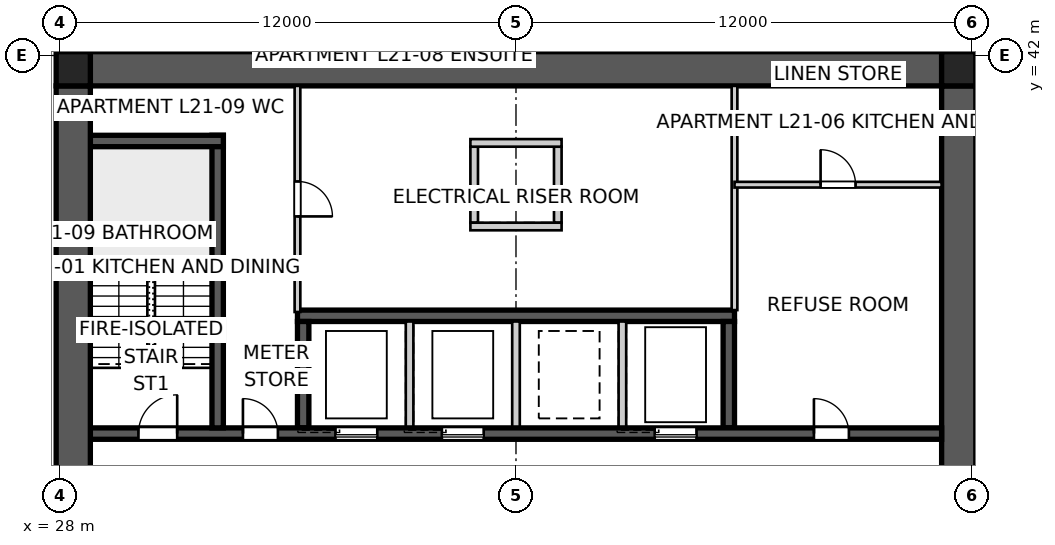
"""IFC4 building model, lengths in metres.
Left out: names, types, materials, properties, quantities, classifications, styles, units other than length and angle.
Written with IfcOpenShell. Run it as: python <this file> out.ifc"""

import sys

from ifc_helpers import new_model, si_unit, direction, frame, frame_2d, origin, origin_2d, place, context, subcontext, project, spatial, polyline, rectangle, outline, extrude, element, fill, save


model = new_model("IFC4")
c1 = context("Model", 3, precision=1e-05, world=origin(), true_north=direction((0.0, 1.0)))
c2 = subcontext(c1, "Body", "Model", "MODEL_VIEW")
j1 = project(units=[si_unit("LENGTHUNIT", "METRE"), si_unit("PLANEANGLEUNIT", "RADIAN")], contexts=[c1])
p1 = place(None, origin())
s1 = spatial("IfcSite", under=j1, at=p1, CompositionType="ELEMENT")
p2 = place(p1, origin())
s2 = spatial("IfcBuilding", under=s1, at=p2, CompositionType="ELEMENT")
p3 = place(p2, frame((0.0, 0.0, 79.4)))
s3 = spatial("IfcBuildingStorey", under=s2, at=p3, CompositionType="ELEMENT", Elevation=79.4)
p4 = place(p3, frame((28.8, 41.65, 0.0), z_axis=(0.0, 0.0, 1.0), x_axis=(1.0, 0.0, 0.0)))
e1 = element("IfcWall", 1, at=p4, inside=s3, PredefinedType="SHEAR", context=c2, shape_type="SweptSolid", body=[
    extrude(outline(polyline([(0.0, -0.45), (22.4, -0.45), (22.4, -0.025), (22.85, -0.025), (22.85, 0.025), (22.4, 0.025), (22.4, 0.45), (0.0, 0.45), (0.0, 0.025), (-0.45, 0.025), (-0.45, -0.025), (0.0, -0.025), (0.0, -0.45)])), origin(), (0.0, 0.0, 1.0), 3.4),
])
p5 = place(p3, frame((51.65, 18.8, 0.0), z_axis=(0.0, 0.0, 1.0), x_axis=(0.0, 1.0, 0.0)))
e2 = element("IfcWall", 2, at=p5, inside=s3, PredefinedType="SHEAR", context=c2, shape_type="SweptSolid", body=[
    extrude(outline(polyline([(0.0, -0.45), (22.4, -0.45), (22.4, -0.025), (22.85, -0.025), (22.85, 0.025), (22.4, 0.025), (22.4, 0.45), (0.0, 0.45), (0.0, 0.025), (-0.45, 0.025), (-0.45, -0.025), (0.0, -0.025), (0.0, -0.45)])), origin(), (0.0, 0.0, 1.0), 3.4),
])
p6 = place(p5, frame((11.14, 0.0, 0.0)))
e3 = element("IfcOpeningElement", 3, at=p6, cuts=e2, PredefinedType="OPENING", context=c2, shape_type="SweptSolid", body=[
    extrude(rectangle(XDim=1.02, YDim=2.4, at=frame_2d((0.51, 1.2))), frame((0.0, 0.46, 0.0), z_axis=(0.0, -1.0, 0.0), x_axis=(1.0, 0.0, 0.0)), (0.0, 0.0, 1.0), 0.92),
])
p7 = place(p3, frame((28.35, 41.2, 0.0), z_axis=(0.0, 0.0, 1.0), x_axis=(0.0, -1.0, 0.0)))
e4 = element("IfcWall", 4, at=p7, inside=s3, PredefinedType="SHEAR", context=c2, shape_type="SweptSolid", body=[
    extrude(outline(polyline([(0.0, -0.45), (22.4, -0.45), (22.4, -0.025), (22.85, -0.025), (22.85, 0.025), (22.4, 0.025), (22.4, 0.45), (0.0, 0.45), (0.0, 0.025), (-0.45, 0.025), (-0.45, -0.025), (0.0, -0.025), (0.0, -0.45)])), origin(), (0.0, 0.0, 1.0), 3.4),
])
p8 = place(p7, frame((11.14, 0.0, 0.0)))
e5 = element("IfcOpeningElement", 5, at=p8, cuts=e4, PredefinedType="OPENING", context=c2, shape_type="SweptSolid", body=[
    extrude(rectangle(XDim=1.02, YDim=2.4, at=frame_2d((0.51, 1.2))), frame((0.0, 0.46, 0.0), z_axis=(0.0, -1.0, 0.0), x_axis=(1.0, 0.0, 0.0)), (0.0, 0.0, 1.0), 0.92),
])
p9 = place(p3, frame((28.8, 32.05, 0.0), z_axis=(0.0, 0.0, 1.0), x_axis=(1.0, 0.0, 0.0)))
e6 = element("IfcWall", 6, at=p9, inside=s3, PredefinedType="SHEAR", context=c2, shape_type="SweptSolid", body=[
    extrude(rectangle(XDim=22.4, YDim=0.3, at=frame_2d((11.2, 0.0))), origin(), (0.0, 0.0, 1.0), 3.4),
])
p10 = place(p9, frame((19.04, 0.0, 0.0)))
e7 = element("IfcOpeningElement", 7, at=p10, cuts=e6, PredefinedType="OPENING", context=c2, shape_type="SweptSolid", body=[
    extrude(rectangle(XDim=0.92, YDim=2.1, at=frame_2d((0.46, 1.05))), frame((0.0, 0.16, 0.0), z_axis=(0.0, -1.0, 0.0), x_axis=(1.0, 0.0, 0.0)), (0.0, 0.0, 1.0), 0.32),
])
p11 = place(p9, frame((1.265, 0.0, 0.0)))
e8 = element("IfcOpeningElement", 8, at=p11, cuts=e6, PredefinedType="OPENING", context=c2, shape_type="SweptSolid", body=[
    extrude(rectangle(XDim=1.02, YDim=2.1, at=frame_2d((0.51, 1.05))), frame((0.0, 0.16, 0.0), z_axis=(0.0, -1.0, 0.0), x_axis=(1.0, 0.0, 0.0)), (0.0, 0.0, 1.0), 0.32),
])
p12 = place(p9, frame((4.015, 0.0, 0.0)))
e9 = element("IfcOpeningElement", 9, at=p12, cuts=e6, PredefinedType="OPENING", context=c2, shape_type="SweptSolid", body=[
    extrude(rectangle(XDim=0.92, YDim=2.1, at=frame_2d((0.46, 1.05))), frame((0.0, 0.16, 0.0), z_axis=(0.0, -1.0, 0.0), x_axis=(1.0, 0.0, 0.0)), (0.0, 0.0, 1.0), 0.32),
])
p13 = place(p9, frame((6.45, 0.0, 0.0)))
e10 = element("IfcOpeningElement", 10, at=p13, cuts=e6, PredefinedType="OPENING", context=c2, shape_type="SweptSolid", body=[
    extrude(rectangle(XDim=1.1, YDim=2.1, at=frame_2d((0.55, 1.05))), frame((0.0, 0.16, 0.0), z_axis=(0.0, -1.0, 0.0), x_axis=(1.0, 0.0, 0.0)), (0.0, 0.0, 1.0), 0.32),
])
p14 = place(p9, frame((9.25, 0.0, 0.0)))
e11 = element("IfcOpeningElement", 11, at=p14, cuts=e6, PredefinedType="OPENING", context=c2, shape_type="SweptSolid", body=[
    extrude(rectangle(XDim=1.1, YDim=2.1, at=frame_2d((0.55, 1.05))), frame((0.0, 0.16, 0.0), z_axis=(0.0, -1.0, 0.0), x_axis=(1.0, 0.0, 0.0)), (0.0, 0.0, 1.0), 0.32),
])
p15 = place(p9, frame((14.85, 0.0, 0.0)))
e12 = element("IfcOpeningElement", 12, at=p15, cuts=e6, PredefinedType="OPENING", context=c2, shape_type="SweptSolid", body=[
    extrude(rectangle(XDim=1.1, YDim=2.1, at=frame_2d((0.55, 1.05))), frame((0.0, 0.16, 0.0), z_axis=(0.0, -1.0, 0.0), x_axis=(1.0, 0.0, 0.0)), (0.0, 0.0, 1.0), 0.32),
])
p16 = place(p3, frame((34.25, 35.15, 0.0), z_axis=(0.0, 0.0, 1.0), x_axis=(1.0, 0.0, 0.0)))
e13 = element("IfcWall", 13, at=p16, inside=s3, PredefinedType="SHEAR", context=c2, shape_type="SweptSolid", body=[
    extrude(rectangle(XDim=11.5, YDim=0.3, at=frame_2d((5.75, 0.0))), origin(), (0.0, 0.0, 1.0), 3.4),
])
p17 = place(p3, frame((34.4, 32.2, 0.0), z_axis=(0.0, 0.0, 1.0), x_axis=(0.0, 1.0, 0.0)))
e14 = element("IfcWall", 14, at=p17, inside=s3, PredefinedType="SHEAR", context=c2, shape_type="SweptSolid", body=[
    extrude(rectangle(XDim=2.8, YDim=0.3, at=frame_2d((1.4, 0.0))), origin(), (0.0, 0.0, 1.0), 3.4),
])
for number, where, z_axis, x_axis in (
    (15, (37.2, 32.2, 0.0), (0.0, 0.0, 1.0), (0.0, 1.0, 0.0)),
    (16, (40.0, 32.2, 0.0), (0.0, 0.0, 1.0), (0.0, 1.0, 0.0)),
    (17, (42.8, 32.2, 0.0), (0.0, 0.0, 1.0), (0.0, 1.0, 0.0)),
):
    element("IfcWall", number, at=place(p3, frame(where, z_axis=z_axis, x_axis=x_axis)), inside=s3, PredefinedType="SOLIDWALL", context=c2, shape_type="SweptSolid", body=[
        extrude(rectangle(XDim=2.8, YDim=0.2, at=frame_2d((1.4, 0.0))), origin(), (0.0, 0.0, 1.0), 3.4),
    ])
p18 = place(p3, frame((45.6, 32.2, 0.0), z_axis=(0.0, 0.0, 1.0), x_axis=(0.0, 1.0, 0.0)))
e18 = element("IfcWall", 18, at=p18, inside=s3, PredefinedType="SHEAR", context=c2, shape_type="SweptSolid", body=[
    extrude(rectangle(XDim=2.8, YDim=0.3, at=frame_2d((1.4, 0.0))), origin(), (0.0, 0.0, 1.0), 3.4),
])
p19 = place(p3, frame((32.15, 32.2, 0.0), z_axis=(0.0, 0.0, 1.0), x_axis=(0.0, 1.0, 0.0)))
e19 = element("IfcWall", 19, at=p19, inside=s3, PredefinedType="SHEAR", context=c2, shape_type="SweptSolid", body=[
    extrude(rectangle(XDim=7.7, YDim=0.3, at=frame_2d((3.85, 0.0))), origin(), (0.0, 0.0, 1.0), 3.4),
])
p20 = place(p3, frame((28.8, 39.75, 0.0), z_axis=(0.0, 0.0, 1.0), x_axis=(1.0, 0.0, 0.0)))
e20 = element("IfcWall", 20, at=p20, inside=s3, PredefinedType="SHEAR", context=c2, shape_type="SweptSolid", body=[
    extrude(rectangle(XDim=3.5, YDim=0.3, at=frame_2d((1.75, 0.0))), origin(), (0.0, 0.0, 1.0), 3.4),
])
for number, where, z_axis, x_axis in (
    (21, (38.9, 37.6, 0.0), (0.0, 0.0, 1.0), (0.0, 1.0, 0.0)),
    (22, (41.1, 37.6, 0.0), (0.0, 0.0, 1.0), (0.0, 1.0, 0.0)),
):
    element("IfcWall", number, at=place(p3, frame(where, z_axis=z_axis, x_axis=x_axis)), inside=s3, PredefinedType="SOLIDWALL", context=c2, shape_type="SweptSolid", body=[
        extrude(rectangle(XDim=2.0, YDim=0.2, at=frame_2d((1.0, 0.0))), origin(), (0.0, 0.0, 1.0), 3.4),
    ])
for number, where, z_axis, x_axis in (
    (23, (38.8, 37.5, 0.0), (0.0, 0.0, 1.0), (1.0, 0.0, 0.0)),
    (24, (38.8, 39.7, 0.0), (0.0, 0.0, 1.0), (1.0, 0.0, 0.0)),
):
    element("IfcWall", number, at=place(p3, frame(where, z_axis=z_axis, x_axis=x_axis)), inside=s3, PredefinedType="SOLIDWALL", context=c2, shape_type="SweptSolid", body=[
        extrude(rectangle(XDim=2.4, YDim=0.2, at=frame_2d((1.2, 0.0))), origin(), (0.0, 0.0, 1.0), 3.4),
    ])
for number, where, z_axis, x_axis in (
    (25, (51.65, 41.65, 0.0), (0.0, 0.0, 1.0), (1.0, 0.0, 0.0)),
    (26, (28.35, 41.65, 0.0), (0.0, 0.0, 1.0), (1.0, 0.0, 0.0)),
):
    element("IfcColumn", number, at=place(p3, frame(where, z_axis=z_axis, x_axis=x_axis)), inside=s3, PredefinedType="COLUMN", context=c2, shape_type="SweptSolid", body=[
        extrude(rectangle(XDim=0.9, YDim=0.9, at=origin_2d()), origin(), (0.0, 0.0, 1.0), 3.4),
    ])
p21 = place(p3, frame((34.25, 41.2, 0.0), z_axis=(0.0, 0.0, 1.0), x_axis=(0.0, -1.0, 0.0)))
e27 = element("IfcWall", 27, at=p21, inside=s3, PredefinedType="SOLIDWALL", context=c2, shape_type="SweptSolid", body=[
    extrude(rectangle(XDim=5.95, YDim=0.15, at=frame_2d((2.975, 0.0))), origin(), (0.0, 0.0, 1.0), 3.25),
])
p22 = place(p21, frame((2.515, 0.0, 0.0)))
e28 = element("IfcOpeningElement", 28, at=p22, cuts=e27, PredefinedType="OPENING", context=c2, shape_type="SweptSolid", body=[
    extrude(rectangle(XDim=0.92, YDim=2.1, at=frame_2d((0.46, 1.05))), frame((0.0, 0.085, 0.0), z_axis=(0.0, -1.0, 0.0), x_axis=(1.0, 0.0, 0.0)), (0.0, 0.0, 1.0), 0.17),
])
p23 = place(p3, frame((45.75, 41.2, 0.0), z_axis=(0.0, 0.0, 1.0), x_axis=(0.0, -1.0, 0.0)))
e29 = element("IfcWall", 29, at=p23, inside=s3, PredefinedType="SOLIDWALL", context=c2, shape_type="SweptSolid", body=[
    extrude(rectangle(XDim=5.9, YDim=0.15, at=frame_2d((2.95, 0.0))), origin(), (0.0, 0.0, 1.0), 3.25),
])
p24 = place(p3, frame((45.75, 38.6, 0.0), z_axis=(0.0, 0.0, 1.0), x_axis=(1.0, 0.0, 0.0)))
e30 = element("IfcWall", 30, at=p24, inside=s3, PredefinedType="SOLIDWALL", context=c2, shape_type="SweptSolid", body=[
    extrude(rectangle(XDim=5.45, YDim=0.15, at=frame_2d((2.725, 0.0))), origin(), (0.0, 0.0, 1.0), 3.25),
])
p25 = place(p24, frame((2.265, 0.0, 0.0)))
e31 = element("IfcOpeningElement", 31, at=p25, cuts=e30, PredefinedType="OPENING", context=c2, shape_type="SweptSolid", body=[
    extrude(rectangle(XDim=0.92, YDim=2.1, at=frame_2d((0.46, 1.05))), frame((0.0, 0.085, 0.0), z_axis=(0.0, -1.0, 0.0), x_axis=(1.0, 0.0, 0.0)), (0.0, 0.0, 1.0), 0.17),
])
p26 = place(p10, origin())
e32 = element("IfcDoor", 32, at=p26, inside=s3, OperationType="SINGLE_SWING_LEFT", PredefinedType="DOOR", context=c2, shape_type="SweptSolid", body=[
    extrude(rectangle(XDim=0.92, YDim=2.1, at=frame_2d((0.46, 1.05))), frame((0.0, 0.025, 0.0), z_axis=(0.0, -1.0, 0.0), x_axis=(1.0, 0.0, 0.0)), (0.0, 0.0, 1.0), 0.05),
])
fill(e7, e32)
p27 = place(p11, origin())
e33 = element("IfcDoor", 33, at=p27, inside=s3, OperationType="SINGLE_SWING_RIGHT", PredefinedType="DOOR", context=c2, shape_type="SweptSolid", body=[
    extrude(rectangle(XDim=1.02, YDim=2.1, at=frame_2d((0.51, 1.05))), frame((0.0, 0.025, 0.0), z_axis=(0.0, -1.0, 0.0), x_axis=(1.0, 0.0, 0.0)), (0.0, 0.0, 1.0), 0.05),
])
fill(e8, e33)
p28 = place(p12, origin())
e34 = element("IfcDoor", 34, at=p28, inside=s3, OperationType="SINGLE_SWING_LEFT", PredefinedType="DOOR", context=c2, shape_type="SweptSolid", body=[
    extrude(rectangle(XDim=0.92, YDim=2.1, at=frame_2d((0.46, 1.05))), frame((0.0, 0.025, 0.0), z_axis=(0.0, -1.0, 0.0), x_axis=(1.0, 0.0, 0.0)), (0.0, 0.0, 1.0), 0.05),
])
fill(e9, e34)
p29 = place(p25, origin())
e35 = element("IfcDoor", 35, at=p29, inside=s3, OperationType="SINGLE_SWING_LEFT", PredefinedType="DOOR", context=c2, shape_type="SweptSolid", body=[
    extrude(rectangle(XDim=0.92, YDim=2.1, at=frame_2d((0.46, 1.05))), frame((0.0, 0.025, 0.0), z_axis=(0.0, -1.0, 0.0), x_axis=(1.0, 0.0, 0.0)), (0.0, 0.0, 1.0), 0.05),
])
fill(e31, e35)
p30 = place(p22, origin())
e36 = element("IfcDoor", 36, at=p30, inside=s3, OperationType="SINGLE_SWING_RIGHT", PredefinedType="DOOR", context=c2, shape_type="SweptSolid", body=[
    extrude(rectangle(XDim=0.92, YDim=2.1, at=frame_2d((0.46, 1.05))), frame((0.0, 0.025, 0.0), z_axis=(0.0, -1.0, 0.0), x_axis=(1.0, 0.0, 0.0)), (0.0, 0.0, 1.0), 0.05),
])
fill(e28, e36)
p31 = place(p13, origin())
e37 = element("IfcDoor", 37, at=p31, inside=s3, OperationType="SLIDING_TO_LEFT", PredefinedType="DOOR", context=c2, shape_type="SweptSolid", body=[
    extrude(rectangle(XDim=1.1, YDim=2.1, at=frame_2d((0.55, 1.05))), frame((0.0, 0.025, 0.0), z_axis=(0.0, -1.0, 0.0), x_axis=(1.0, 0.0, 0.0)), (0.0, 0.0, 1.0), 0.05),
])
fill(e10, e37)
p32 = place(p14, origin())
e38 = element("IfcDoor", 38, at=p32, inside=s3, OperationType="SLIDING_TO_LEFT", PredefinedType="DOOR", context=c2, shape_type="SweptSolid", body=[
    extrude(rectangle(XDim=1.1, YDim=2.1, at=frame_2d((0.55, 1.05))), frame((0.0, 0.025, 0.0), z_axis=(0.0, -1.0, 0.0), x_axis=(1.0, 0.0, 0.0)), (0.0, 0.0, 1.0), 0.05),
])
fill(e11, e38)
p33 = place(p15, origin())
e39 = element("IfcDoor", 39, at=p33, inside=s3, OperationType="SLIDING_TO_LEFT", PredefinedType="DOOR", context=c2, shape_type="SweptSolid", body=[
    extrude(rectangle(XDim=1.1, YDim=2.1, at=frame_2d((0.55, 1.05))), frame((0.0, 0.025, 0.0), z_axis=(0.0, -1.0, 0.0), x_axis=(1.0, 0.0, 0.0)), (0.0, 0.0, 1.0), 0.05),
])
fill(e12, e39)
save(model, sys.argv[1])
